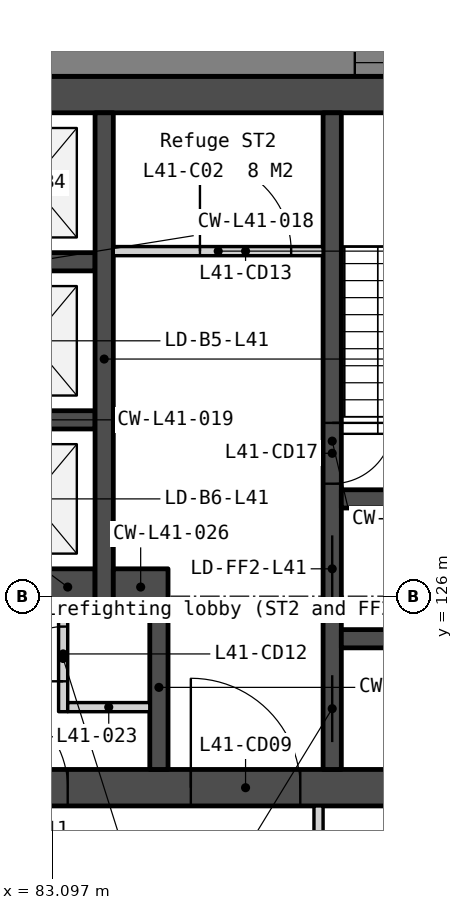
"""IFC4 building model, lengths in metres.
Left out: names, types, materials, properties, quantities, classifications, styles, units other than length and angle.
Written with IfcOpenShell. Run it as: python <this file> out.ifc"""

import sys

from ifc_helpers import new_model, si_unit, direction, frame, frame_2d, origin, place, context, subcontext, project, spatial, polyline, rectangle, outline, extrude, element, fill, save


model = new_model("IFC4")
c1 = context("Model", 3, precision=1e-05, world=origin(), true_north=direction((0.0, 1.0)))
c2 = subcontext(c1, "Body", "Model", "MODEL_VIEW")
j1 = project(units=[si_unit("LENGTHUNIT", "METRE"), si_unit("PLANEANGLEUNIT", "RADIAN")], contexts=[c1])
p1 = place(None, origin())
s1 = spatial("IfcSite", under=j1, at=p1, CompositionType="ELEMENT")
p2 = place(p1, origin())
s2 = spatial("IfcBuilding", under=s1, at=p2, CompositionType="ELEMENT")
p3 = place(p2, frame((0.0, 0.0, 163.7)))
s3 = spatial("IfcBuildingStorey", under=s2, at=p3, CompositionType="ELEMENT", Elevation=163.7)
p4 = place(p3, frame((69.0, 134.25, 0.0), z_axis=(0.0, 0.0, 1.0), x_axis=(1.0, 0.0, 0.0)))
e1 = element("IfcWall", 1, at=p4, inside=s3, PredefinedType="SOLIDWALL", context=c2, shape_type="SweptSolid", body=[
    extrude(rectangle(XDim=22.0, YDim=0.6, at=frame_2d((11.0, 0.0))), origin(), (0.0, 0.0, 1.0), 3.75),
])
p5 = place(p3, frame((69.0, 122.85, 0.0), z_axis=(0.0, 0.0, 1.0), x_axis=(1.0, 0.0, 0.0)))
e2 = element("IfcWall", 2, at=p5, inside=s3, PredefinedType="SOLIDWALL", context=c2, shape_type="SweptSolid", body=[
    extrude(rectangle(XDim=22.0, YDim=0.6, at=frame_2d((11.0, 0.0))), origin(), (0.0, 0.0, 1.0), 3.75),
])
p6 = place(p5, frame((16.375, 0.0, 0.0)))
e3 = element("IfcOpeningElement", 3, at=p6, cuts=e2, PredefinedType="OPENING", context=c2, shape_type="SweptSolid", body=[
    extrude(rectangle(XDim=1.8, YDim=2.1, at=frame_2d((0.9, 1.05))), frame((0.0, 0.31, 0.0), z_axis=(0.0, -1.0, 0.0), x_axis=(1.0, 0.0, 0.0)), (0.0, 0.0, 1.0), 0.62),
])
p7 = place(p5, frame((3.825, 0.0, 0.0)))
e4 = element("IfcOpeningElement", 4, at=p7, cuts=e2, PredefinedType="OPENING", context=c2, shape_type="SweptSolid", body=[
    extrude(rectangle(XDim=1.8, YDim=2.1, at=frame_2d((0.9, 1.05))), frame((0.0, 0.31, 0.0), z_axis=(0.0, -1.0, 0.0), x_axis=(1.0, 0.0, 0.0)), (0.0, 0.0, 1.0), 0.62),
])
p8 = place(p5, frame((12.85, 0.0, 0.0)))
e5 = element("IfcOpeningElement", 5, at=p8, cuts=e2, PredefinedType="OPENING", context=c2, shape_type="SweptSolid", body=[
    extrude(rectangle(XDim=1.5, YDim=2.1, at=frame_2d((0.75, 1.05))), frame((0.0, 0.31, 0.0), z_axis=(0.0, -1.0, 0.0), x_axis=(1.0, 0.0, 0.0)), (0.0, 0.0, 1.0), 0.62),
])
for number, where, z_axis, x_axis in (
    (6, (81.7, 131.5, 0.0), (0.0, 0.0, 1.0), (1.0, 0.0, 0.0)),
    (7, (81.7, 128.9, 0.0), (0.0, 0.0, 1.0), (1.0, 0.0, 0.0)),
):
    element("IfcWall", number, at=place(p3, frame(where, z_axis=z_axis, x_axis=x_axis)), inside=s3, PredefinedType="SOLIDWALL", context=c2, shape_type="SweptSolid", body=[
        extrude(rectangle(XDim=2.1, YDim=0.3, at=frame_2d((1.05, 0.0))), origin(), (0.0, 0.0, 1.0), 3.75),
    ])
p9 = place(p3, frame((82.9, 126.15, 0.0), z_axis=(0.0, 0.0, 1.0), x_axis=(1.0, 0.0, 0.0)))
e8 = element("IfcWall", 8, at=p9, inside=s3, PredefinedType="SOLIDWALL", context=c2, shape_type="SweptSolid", body=[
    extrude(rectangle(XDim=0.9, YDim=0.6, at=frame_2d((0.45, 0.0))), origin(), (0.0, 0.0, 1.0), 3.75),
])
p10 = place(p3, frame((83.275, 125.85, 0.0), z_axis=(0.0, 0.0, 1.0), x_axis=(0.0, -1.0, 0.0)))
e9 = element("IfcWall", 9, at=p10, inside=s3, PredefinedType="PARTITIONING", context=c2, shape_type="SweptSolid", body=[
    extrude(rectangle(XDim=1.75, YDim=0.15, at=frame_2d((0.875, 0.0))), origin(), (0.0, 0.0, 1.0), 3.75),
])
p11 = place(p10, frame((0.35, 0.0, 0.0)))
e10 = element("IfcOpeningElement", 10, at=p11, cuts=e9, PredefinedType="OPENING", context=c2, shape_type="SweptSolid", body=[
    extrude(rectangle(XDim=0.9, YDim=2.1, at=frame_2d((0.45, 1.05))), frame((0.0, 0.085, 0.0), z_axis=(0.0, -1.0, 0.0), x_axis=(1.0, 0.0, 0.0)), (0.0, 0.0, 1.0), 0.17),
])
p12 = place(p3, frame((83.35, 124.175, 0.0), z_axis=(0.0, 0.0, 1.0), x_axis=(1.0, 0.0, 0.0)))
e11 = element("IfcWall", 11, at=p12, inside=s3, PredefinedType="PARTITIONING", context=c2, shape_type="SweptSolid", body=[
    extrude(rectangle(XDim=1.35, YDim=0.15, at=frame_2d((0.675, 0.0))), origin(), (0.0, 0.0, 1.0), 3.75),
])
p13 = place(p3, frame((83.95, 133.95, 0.0), z_axis=(0.0, 0.0, 1.0), x_axis=(0.0, -1.0, 0.0)))
e12 = element("IfcWall", 12, at=p13, inside=s3, PredefinedType="SOLIDWALL", context=c2, shape_type="SweptSolid", body=[
    extrude(rectangle(XDim=8.1, YDim=0.3, at=frame_2d((4.05, 0.0))), origin(), (0.0, 0.0, 1.0), 3.75),
])
p14 = place(p3, frame((84.1, 131.675, 0.0), z_axis=(0.0, 0.0, 1.0), x_axis=(1.0, 0.0, 0.0)))
e13 = element("IfcWall", 13, at=p14, inside=s3, PredefinedType="PARTITIONING", context=c2, shape_type="SweptSolid", body=[
    extrude(rectangle(XDim=3.45, YDim=0.15, at=frame_2d((1.725, 0.0))), origin(), (0.0, 0.0, 1.0), 3.75),
])
p15 = place(p14, frame((1.425, 0.0, 0.0)))
e14 = element("IfcOpeningElement", 14, at=p15, cuts=e13, PredefinedType="OPENING", context=c2, shape_type="SweptSolid", body=[
    extrude(rectangle(XDim=1.5, YDim=2.1, at=frame_2d((0.75, 1.05))), frame((0.0, 0.085, 0.0), z_axis=(0.0, -1.0, 0.0), x_axis=(1.0, 0.0, 0.0)), (0.0, 0.0, 1.0), 0.17),
])
p16 = place(p3, frame((84.1, 126.15, 0.0), z_axis=(0.0, 0.0, 1.0), x_axis=(1.0, 0.0, 0.0)))
e15 = element("IfcWall", 15, at=p16, inside=s3, PredefinedType="SOLIDWALL", context=c2, shape_type="SweptSolid", body=[
    extrude(rectangle(XDim=0.9, YDim=0.6, at=frame_2d((0.45, 0.0))), origin(), (0.0, 0.0, 1.0), 3.75),
])
p17 = place(p3, frame((84.85, 125.85, 0.0), z_axis=(0.0, 0.0, 1.0), x_axis=(0.0, -1.0, 0.0)))
e16 = element("IfcWall", 16, at=p17, inside=s3, PredefinedType="SOLIDWALL", context=c2, shape_type="SweptSolid", body=[
    extrude(rectangle(XDim=2.7, YDim=0.3, at=frame_2d((1.35, 0.0))), origin(), (0.0, 0.0, 1.0), 3.75),
])
p18 = place(p3, frame((87.7, 133.95, 0.0), z_axis=(0.0, 0.0, 1.0), x_axis=(0.0, -1.0, 0.0)))
e17 = element("IfcWall", 17, at=p18, inside=s3, PredefinedType="SOLIDWALL", context=c2, shape_type="SweptSolid", body=[
    extrude(rectangle(XDim=10.8, YDim=0.3, at=frame_2d((5.4, 0.0))), origin(), (0.0, 0.0, 1.0), 3.75),
])
p19 = place(p18, frame((6.95, 0.0, 0.0)))
e18 = element("IfcOpeningElement", 18, at=p19, cuts=e17, PredefinedType="OPENING", context=c2, shape_type="SweptSolid", body=[
    extrude(rectangle(XDim=1.1, YDim=2.1, at=frame_2d((0.55, 1.05))), frame((0.0, 0.16, 0.0), z_axis=(0.0, -1.0, 0.0), x_axis=(1.0, 0.0, 0.0)), (0.0, 0.0, 1.0), 0.32),
])
p20 = place(p18, frame((5.1, 0.0, 0.0)))
e19 = element("IfcOpeningElement", 19, at=p20, cuts=e17, PredefinedType="OPENING", context=c2, shape_type="SweptSolid", body=[
    extrude(rectangle(XDim=1.0, YDim=2.1, at=frame_2d((0.5, 1.05))), frame((0.0, 0.16, 0.0), z_axis=(0.0, -1.0, 0.0), x_axis=(1.0, 0.0, 0.0)), (0.0, 0.0, 1.0), 0.32),
])
p21 = place(p18, frame((9.25, 0.0, 0.0)))
e20 = element("IfcOpeningElement", 20, at=p21, cuts=e17, PredefinedType="OPENING", context=c2, shape_type="SweptSolid", body=[
    extrude(rectangle(XDim=1.1, YDim=2.1, at=frame_2d((0.55, 1.05))), frame((0.0, 0.16, 0.0), z_axis=(0.0, -1.0, 0.0), x_axis=(1.0, 0.0, 0.0)), (0.0, 0.0, 1.0), 0.32),
])
for number, where, z_axis, x_axis in (
    (21, (87.85, 127.6, 0.0), (0.0, 0.0, 1.0), (1.0, 0.0, 0.0)),
    (22, (87.85, 125.3, 0.0), (0.0, 0.0, 1.0), (1.0, 0.0, 0.0)),
):
    element("IfcWall", number, at=place(p3, frame(where, z_axis=z_axis, x_axis=x_axis)), inside=s3, PredefinedType="SOLIDWALL", context=c2, shape_type="SweptSolid", body=[
        extrude(rectangle(XDim=2.55, YDim=0.3, at=frame_2d((1.275, 0.0))), origin(), (0.0, 0.0, 1.0), 3.75),
    ])
p22 = place(p3, frame((100.243, 134.775, -0.15), z_axis=(0.0, 0.0, 1.0), x_axis=(-1.0, 0.0, 0.0)))
e23 = element("IfcWall", 23, at=p22, inside=s3, PredefinedType="SOLIDWALL", context=c2, shape_type="SweptSolid", body=[
    extrude(outline(polyline([(40.486, 0.0), (40.486, 3.9), (0.0, 3.9), (0.0, 0.0), (40.486, 0.0)])), frame((0.0, 0.225, 0.0), z_axis=(0.0, -1.0, 0.0), x_axis=(1.0, 0.0, 0.0)), (0.0, 0.0, 1.0), 0.45),
])
p23 = place(p22, frame((0.837, 0.0, 0.95)))
e24 = element("IfcOpeningElement", 24, at=p23, cuts=e23, PredefinedType="OPENING", context=c2, shape_type="SweptSolid", body=[
    extrude(rectangle(XDim=1.2, YDim=2.2, at=frame_2d((0.6, 1.1))), frame((0.0, 0.235, 0.0), z_axis=(0.0, -1.0, 0.0), x_axis=(1.0, 0.0, 0.0)), (0.0, 0.0, 1.0), 0.47),
])
p24 = place(p22, frame((8.072, 0.0, 0.95)))
e25 = element("IfcOpeningElement", 25, at=p24, cuts=e23, PredefinedType="OPENING", context=c2, shape_type="SweptSolid", body=[
    extrude(rectangle(XDim=1.8, YDim=2.2, at=frame_2d((0.9, 1.1))), frame((0.0, 0.235, 0.0), z_axis=(0.0, -1.0, 0.0), x_axis=(1.0, 0.0, 0.0)), (0.0, 0.0, 1.0), 0.47),
])
p25 = place(p22, frame((10.372, 0.0, 0.95)))
e26 = element("IfcOpeningElement", 26, at=p25, cuts=e23, PredefinedType="OPENING", context=c2, shape_type="SweptSolid", body=[
    extrude(rectangle(XDim=1.8, YDim=2.2, at=frame_2d((0.9, 1.1))), frame((0.0, 0.235, 0.0), z_axis=(0.0, -1.0, 0.0), x_axis=(1.0, 0.0, 0.0)), (0.0, 0.0, 1.0), 0.47),
])
p26 = place(p22, frame((18.193, 0.0, 0.95)))
e27 = element("IfcOpeningElement", 27, at=p26, cuts=e23, PredefinedType="OPENING", context=c2, shape_type="SweptSolid", body=[
    extrude(rectangle(XDim=1.8, YDim=2.2, at=frame_2d((0.9, 1.1))), frame((0.0, 0.235, 0.0), z_axis=(0.0, -1.0, 0.0), x_axis=(1.0, 0.0, 0.0)), (0.0, 0.0, 1.0), 0.47),
])
p27 = place(p22, frame((20.493, 0.0, 0.95)))
e28 = element("IfcOpeningElement", 28, at=p27, cuts=e23, PredefinedType="OPENING", context=c2, shape_type="SweptSolid", body=[
    extrude(rectangle(XDim=1.8, YDim=2.2, at=frame_2d((0.9, 1.1))), frame((0.0, 0.235, 0.0), z_axis=(0.0, -1.0, 0.0), x_axis=(1.0, 0.0, 0.0)), (0.0, 0.0, 1.0), 0.47),
])
p28 = place(p22, frame((28.315, 0.0, 0.95)))
e29 = element("IfcOpeningElement", 29, at=p28, cuts=e23, PredefinedType="OPENING", context=c2, shape_type="SweptSolid", body=[
    extrude(rectangle(XDim=1.8, YDim=2.2, at=frame_2d((0.9, 1.1))), frame((0.0, 0.235, 0.0), z_axis=(0.0, -1.0, 0.0), x_axis=(1.0, 0.0, 0.0)), (0.0, 0.0, 1.0), 0.47),
])
p29 = place(p22, frame((30.615, 0.0, 0.95)))
e30 = element("IfcOpeningElement", 30, at=p29, cuts=e23, PredefinedType="OPENING", context=c2, shape_type="SweptSolid", body=[
    extrude(rectangle(XDim=1.8, YDim=2.2, at=frame_2d((0.9, 1.1))), frame((0.0, 0.235, 0.0), z_axis=(0.0, -1.0, 0.0), x_axis=(1.0, 0.0, 0.0)), (0.0, 0.0, 1.0), 0.47),
])
p30 = place(p22, frame((38.449, 0.0, 0.95)))
e31 = element("IfcOpeningElement", 31, at=p30, cuts=e23, PredefinedType="OPENING", context=c2, shape_type="SweptSolid", body=[
    extrude(rectangle(XDim=1.2, YDim=2.2, at=frame_2d((0.6, 1.1))), frame((0.0, 0.235, 0.0), z_axis=(0.0, -1.0, 0.0), x_axis=(1.0, 0.0, 0.0)), (0.0, 0.0, 1.0), 0.47),
])
p31 = place(p3, frame((88.166, 106.564, -0.15), z_axis=(0.0, 0.0, 1.0), x_axis=(0.499995644604, 0.866027918359, 0.0)))
e32 = element("IfcWall", 32, at=p31, inside=s3, PredefinedType="SOLIDWALL", context=c2, shape_type="SweptSolid", body=[
    extrude(outline(polyline([(28.365, 3.9), (28.365, 0.0), (0.0, 0.0), (0.0, 3.9), (28.365, 3.9)])), frame((0.0, 0.225, 0.0), z_axis=(0.0, -1.0, 0.0), x_axis=(1.0, 0.0, 0.0)), (0.0, 0.0, 1.0), 0.45),
])
p32 = place(p31, frame((6.072, 0.0, 0.95)))
e33 = element("IfcOpeningElement", 33, at=p32, cuts=e32, PredefinedType="OPENING", context=c2, shape_type="SweptSolid", body=[
    extrude(rectangle(XDim=1.8, YDim=2.2, at=frame_2d((0.9, 1.1))), frame((0.0, 0.235, 0.0), z_axis=(0.0, -1.0, 0.0), x_axis=(1.0, 0.0, 0.0)), (0.0, 0.0, 1.0), 0.47),
])
p33 = place(p31, frame((8.372, 0.0, 0.95)))
e34 = element("IfcOpeningElement", 34, at=p33, cuts=e32, PredefinedType="OPENING", context=c2, shape_type="SweptSolid", body=[
    extrude(rectangle(XDim=1.8, YDim=2.2, at=frame_2d((0.9, 1.1))), frame((0.0, 0.235, 0.0), z_axis=(0.0, -1.0, 0.0), x_axis=(1.0, 0.0, 0.0)), (0.0, 0.0, 1.0), 0.47),
])
p34 = place(p31, frame((16.193, 0.0, 0.95)))
e35 = element("IfcOpeningElement", 35, at=p34, cuts=e32, PredefinedType="OPENING", context=c2, shape_type="SweptSolid", body=[
    extrude(rectangle(XDim=1.8, YDim=2.2, at=frame_2d((0.9, 1.1))), frame((0.0, 0.235, 0.0), z_axis=(0.0, -1.0, 0.0), x_axis=(1.0, 0.0, 0.0)), (0.0, 0.0, 1.0), 0.47),
])
p35 = place(p31, frame((18.493, 0.0, 0.95)))
e36 = element("IfcOpeningElement", 36, at=p35, cuts=e32, PredefinedType="OPENING", context=c2, shape_type="SweptSolid", body=[
    extrude(rectangle(XDim=1.8, YDim=2.2, at=frame_2d((0.9, 1.1))), frame((0.0, 0.235, 0.0), z_axis=(0.0, -1.0, 0.0), x_axis=(1.0, 0.0, 0.0)), (0.0, 0.0, 1.0), 0.47),
])
p36 = place(p31, frame((26.327, 0.0, 0.95)))
e37 = element("IfcOpeningElement", 37, at=p36, cuts=e32, PredefinedType="OPENING", context=c2, shape_type="SweptSolid", body=[
    extrude(rectangle(XDim=1.2, YDim=2.2, at=frame_2d((0.6, 1.1))), frame((0.0, 0.235, 0.0), z_axis=(0.0, -1.0, 0.0), x_axis=(1.0, 0.0, 0.0)), (0.0, 0.0, 1.0), 0.47),
])
p37 = place(p3, frame((87.475, 120.05, 0.0), z_axis=(0.0, 0.0, 1.0), x_axis=(0.0, 1.0, 0.0)))
e38 = element("IfcWall", 38, at=p37, inside=s3, PredefinedType="PARTITIONING", context=c2, shape_type="SweptSolid", body=[
    extrude(rectangle(XDim=2.5, YDim=0.15, at=frame_2d((1.25, 0.0))), origin(), (0.0, 0.0, 1.0), 3.75),
])
p38 = place(p37, frame((0.75, 0.0, 0.0)))
e39 = element("IfcOpeningElement", 39, at=p38, cuts=e38, PredefinedType="OPENING", context=c2, shape_type="SweptSolid", body=[
    extrude(rectangle(XDim=1.0, YDim=2.1, at=frame_2d((0.5, 1.05))), frame((0.0, 0.085, 0.0), z_axis=(0.0, -1.0, 0.0), x_axis=(1.0, 0.0, 0.0)), (0.0, 0.0, 1.0), 0.17),
])
p39 = place(p19, origin())
e40 = element("IfcDoor", 40, at=p39, inside=s3, OperationType="SLIDING_TO_LEFT", PredefinedType="DOOR", context=c2, shape_type="SweptSolid", body=[
    extrude(rectangle(XDim=1.1, YDim=2.1, at=frame_2d((0.55, 1.05))), frame((0.0, 0.025, 0.0), z_axis=(0.0, -1.0, 0.0), x_axis=(1.0, 0.0, 0.0)), (0.0, 0.0, 1.0), 0.05),
])
fill(e18, e40)
p40 = place(p6, origin())
e41 = element("IfcDoor", 41, at=p40, inside=s3, OperationType="DOUBLE_DOOR_DOUBLE_SWING", PredefinedType="DOOR", context=c2, shape_type="SweptSolid", body=[
    extrude(rectangle(XDim=1.8, YDim=2.1, at=frame_2d((0.9, 1.05))), frame((0.0, 0.025, 0.0), z_axis=(0.0, -1.0, 0.0), x_axis=(1.0, 0.0, 0.0)), (0.0, 0.0, 1.0), 0.05),
])
fill(e3, e41)
p41 = place(p8, origin())
e42 = element("IfcDoor", 42, at=p41, inside=s3, OperationType="DOUBLE_DOOR_DOUBLE_SWING", PredefinedType="DOOR", context=c2, shape_type="SweptSolid", body=[
    extrude(rectangle(XDim=1.5, YDim=2.1, at=frame_2d((0.75, 1.05))), frame((0.0, 0.025, 0.0), z_axis=(0.0, -1.0, 0.0), x_axis=(1.0, 0.0, 0.0)), (0.0, 0.0, 1.0), 0.05),
])
fill(e5, e42)
p42 = place(p11, origin())
e43 = element("IfcDoor", 43, at=p42, inside=s3, OperationType="SINGLE_SWING_RIGHT", PredefinedType="DOOR", context=c2, shape_type="SweptSolid", body=[
    extrude(rectangle(XDim=0.9, YDim=2.1, at=frame_2d((0.45, 1.05))), frame((0.0, 0.025, 0.0), z_axis=(0.0, -1.0, 0.0), x_axis=(1.0, 0.0, 0.0)), (0.0, 0.0, 1.0), 0.05),
])
fill(e10, e43)
p43 = place(p15, origin())
e44 = element("IfcDoor", 44, at=p43, inside=s3, OperationType="DOUBLE_DOOR_DOUBLE_SWING", PredefinedType="DOOR", context=c2, shape_type="SweptSolid", body=[
    extrude(rectangle(XDim=1.5, YDim=2.1, at=frame_2d((0.75, 1.05))), frame((0.0, 0.025, 0.0), z_axis=(0.0, -1.0, 0.0), x_axis=(1.0, 0.0, 0.0)), (0.0, 0.0, 1.0), 0.05),
])
fill(e14, e44)
p44 = place(p20, origin())
e45 = element("IfcDoor", 45, at=p44, inside=s3, OperationType="SINGLE_SWING_LEFT", PredefinedType="DOOR", context=c2, shape_type="SweptSolid", body=[
    extrude(rectangle(XDim=1.0, YDim=2.1, at=frame_2d((0.5, 1.05))), frame((0.0, 0.025, 0.0), z_axis=(0.0, -1.0, 0.0), x_axis=(1.0, 0.0, 0.0)), (0.0, 0.0, 1.0), 0.05),
])
fill(e19, e45)
p45 = place(p21, origin())
e46 = element("IfcDoor", 46, at=p45, inside=s3, OperationType="SLIDING_TO_LEFT", PredefinedType="DOOR", context=c2, shape_type="SweptSolid", body=[
    extrude(rectangle(XDim=1.1, YDim=2.1, at=frame_2d((0.55, 1.05))), frame((0.0, 0.025, 0.0), z_axis=(0.0, -1.0, 0.0), x_axis=(1.0, 0.0, 0.0)), (0.0, 0.0, 1.0), 0.05),
])
fill(e20, e46)
p46 = place(p25, origin())
e47 = element("IfcWindow", 47, at=p46, inside=s3, PartitioningType="SINGLE_PANEL", PredefinedType="WINDOW", context=c2, shape_type="SweptSolid", body=[
    extrude(rectangle(XDim=1.8, YDim=2.2, at=frame_2d((0.9, 1.1))), frame((0.0, 0.03, 0.0), z_axis=(0.0, -1.0, 0.0), x_axis=(1.0, 0.0, 0.0)), (0.0, 0.0, 1.0), 0.06),
])
fill(e26, e47)
save(model, sys.argv[1])
